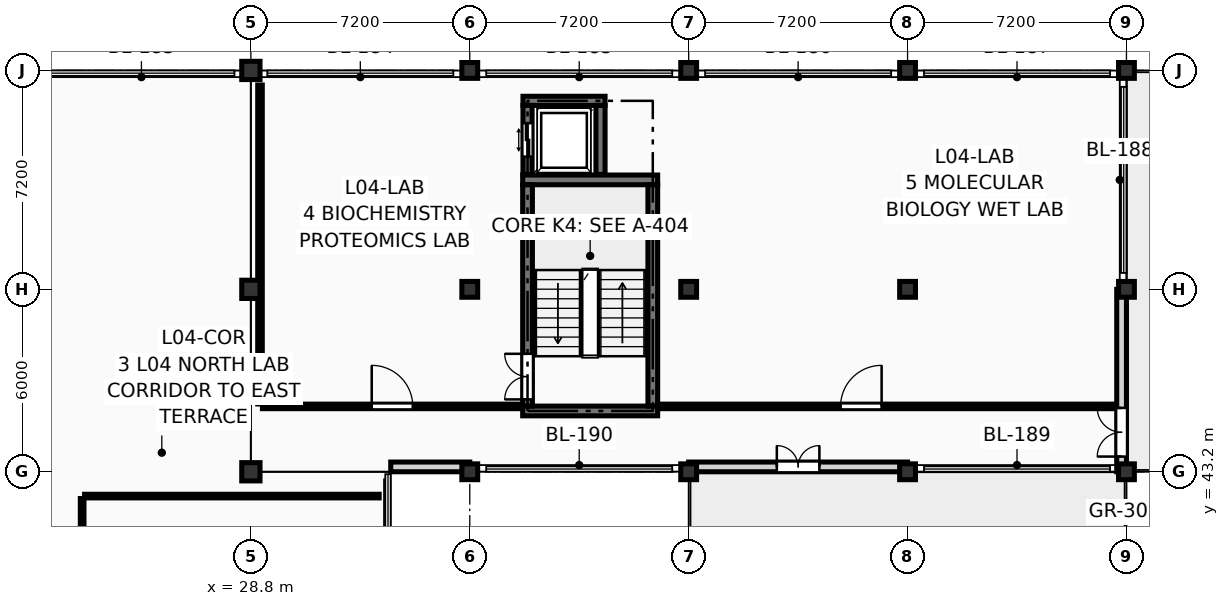
"""IFC4 building model, lengths in metres.
Left out: names, types, materials, properties, quantities, classifications, styles, units other than length and angle.
Written with IfcOpenShell. Run it as: python <this file> out.ifc"""

import sys

from ifc_helpers import new_model, si_unit, direction, frame, frame_2d, origin, origin_2d, place, context, subcontext, project, spatial, rectangle, extrude, element, fill, save


model = new_model("IFC4")
c1 = context("Model", 3, precision=1e-05, world=origin(), true_north=direction((0.0, 1.0)))
c2 = subcontext(c1, "Body", "Model", "MODEL_VIEW")
j1 = project(units=[si_unit("LENGTHUNIT", "METRE"), si_unit("PLANEANGLEUNIT", "RADIAN")], contexts=[c1])
p1 = place(None, origin())
s1 = spatial("IfcSite", under=j1, at=p1, CompositionType="ELEMENT")
p2 = place(p1, origin())
s2 = spatial("IfcBuilding", under=s1, at=p2, CompositionType="ELEMENT")
p3 = place(p2, frame((0.0, 0.0, 15.75)))
s3 = spatial("IfcBuildingStorey", under=s2, at=p3, CompositionType="ELEMENT", Elevation=15.75)
for number, where, z_axis, x_axis in (
    (1, (28.8, 43.2, 0.0), (0.0, 0.0, 1.0), (1.0, 0.0, 0.0)),
    (2, (28.8, 49.2, 0.0), (0.0, 0.0, 1.0), (1.0, 0.0, 0.0)),
    (3, (28.8, 56.4, 0.0), (0.0, 0.0, 1.0), (1.0, 0.0, 0.0)),
):
    element("IfcColumn", number, at=place(p3, frame(where, z_axis=z_axis, x_axis=x_axis)), inside=s3, PredefinedType="COLUMN", context=c2, shape_type="SweptSolid", body=[
        extrude(rectangle(XDim=0.6, YDim=0.6, at=origin_2d()), origin(), (0.0, 0.0, 1.0), 3.6),
    ])
for number, where, z_axis, x_axis in (
    (4, (36.0, 43.2, 0.0), (0.0, 0.0, 1.0), (1.0, 0.0, 0.0)),
    (5, (36.0, 49.2, 0.0), (0.0, 0.0, 1.0), (1.0, 0.0, 0.0)),
    (6, (36.0, 56.4, 0.0), (0.0, 0.0, 1.0), (1.0, 0.0, 0.0)),
    (7, (43.2, 43.2, 0.0), (0.0, 0.0, 1.0), (1.0, 0.0, 0.0)),
    (8, (43.2, 49.2, 0.0), (0.0, 0.0, 1.0), (1.0, 0.0, 0.0)),
    (9, (43.2, 56.4, 0.0), (0.0, 0.0, 1.0), (1.0, 0.0, 0.0)),
    (10, (50.4, 43.2, 0.0), (0.0, 0.0, 1.0), (1.0, 0.0, 0.0)),
    (11, (50.4, 49.2, 0.0), (0.0, 0.0, 1.0), (1.0, 0.0, 0.0)),
    (12, (50.4, 56.4, 0.0), (0.0, 0.0, 1.0), (1.0, 0.0, 0.0)),
    (13, (57.6, 43.2, 0.0), (0.0, 0.0, 1.0), (1.0, 0.0, 0.0)),
    (14, (57.6, 49.2, 0.0), (0.0, 0.0, 1.0), (1.0, 0.0, 0.0)),
    (15, (57.6, 56.4, 0.0), (0.0, 0.0, 1.0), (1.0, 0.0, 0.0)),
):
    element("IfcColumn", number, at=place(p3, frame(where, z_axis=z_axis, x_axis=x_axis)), inside=s3, PredefinedType="COLUMN", context=c2, shape_type="SweptSolid", body=[
        extrude(rectangle(XDim=0.52, YDim=0.52, at=origin_2d()), origin(), (0.0, 0.0, 1.0), 3.6),
    ])
p4 = place(p3, frame((57.44, 43.2, 0.0), z_axis=(0.0, 0.0, 1.0), x_axis=(0.0, 1.0, 0.0)))
e16 = element("IfcWall", 16, at=p4, inside=s3, PredefinedType="SOLIDWALL", context=c2, shape_type="SweptSolid", body=[
    extrude(rectangle(XDim=6.0, YDim=0.32, at=frame_2d((3.0, 0.0))), origin(), (0.0, 0.0, 1.0), 2.84),
])
p5 = place(p4, frame((0.5, 0.0, 0.0)))
e17 = element("IfcOpeningElement", 17, at=p5, cuts=e16, PredefinedType="OPENING", context=c2, shape_type="SweptSolid", body=[
    extrude(rectangle(XDim=1.6, YDim=2.25, at=frame_2d((0.8, 1.125))), frame((0.0, 0.172, 0.0), z_axis=(0.0, -1.0, 0.0), x_axis=(1.0, 0.0, 0.0)), (0.0, 0.0, 1.0), 0.344),
])
p6 = place(p3, frame((43.2, 43.36, 0.0), z_axis=(0.0, 0.0, 1.0), x_axis=(1.0, 0.0, 0.0)))
e18 = element("IfcWall", 18, at=p6, inside=s3, PredefinedType="SOLIDWALL", context=c2, shape_type="SweptSolid", body=[
    extrude(rectangle(XDim=7.2, YDim=0.32, at=frame_2d((3.6, 0.0))), origin(), (0.0, 0.0, 1.0), 2.84),
])
p7 = place(p6, frame((2.9, 0.0, 0.0)))
e19 = element("IfcOpeningElement", 19, at=p7, cuts=e18, PredefinedType="OPENING", context=c2, shape_type="SweptSolid", body=[
    extrude(rectangle(XDim=1.4, YDim=2.2, at=frame_2d((0.7, 1.1))), frame((0.0, 0.172, 0.0), z_axis=(0.0, -1.0, 0.0), x_axis=(1.0, 0.0, 0.0)), (0.0, 0.0, 1.0), 0.344),
])
p8 = place(p3, frame((33.4, 43.36, 0.0), z_axis=(0.0, 0.0, 1.0), x_axis=(1.0, 0.0, 0.0)))
e20 = element("IfcWall", 20, at=p8, inside=s3, PredefinedType="SOLIDWALL", context=c2, shape_type="SweptSolid", body=[
    extrude(rectangle(XDim=2.6, YDim=0.32, at=frame_2d((1.3, 0.0))), origin(), (0.0, 0.0, 1.0), 3.38),
])
for number, where, z_axis, x_axis in (
    (21, (37.74, 45.2, 0.0), (0.0, 0.0, 1.0), (1.0, 0.0, 0.0)),
    (22, (37.74, 52.8, 0.0), (0.0, 0.0, 1.0), (1.0, 0.0, 0.0)),
):
    element("IfcWall", number, at=place(p3, frame(where, z_axis=z_axis, x_axis=x_axis)), inside=s3, PredefinedType="SHEAR", context=c2, shape_type="SweptSolid", body=[
        extrude(rectangle(XDim=4.44, YDim=0.32, at=frame_2d((2.22, 0.0))), origin(), (0.0, 0.0, 1.0), 3.39),
    ])
p9 = place(p3, frame((37.9, 45.36, 0.0), z_axis=(0.0, 0.0, 1.0), x_axis=(0.0, 1.0, 0.0)))
e23 = element("IfcWall", 23, at=p9, inside=s3, PredefinedType="SHEAR", context=c2, shape_type="SweptSolid", body=[
    extrude(rectangle(XDim=7.28, YDim=0.32, at=frame_2d((3.64, 0.0))), origin(), (0.0, 0.0, 1.0), 3.39),
])
p10 = place(p9, frame((0.22, 0.0, 0.0)))
e24 = element("IfcOpeningElement", 24, at=p10, cuts=e23, PredefinedType="OPENING", context=c2, shape_type="SweptSolid", body=[
    extrude(rectangle(XDim=1.5, YDim=2.2, at=frame_2d((0.75, 1.1))), frame((0.0, 0.172, 0.0), z_axis=(0.0, -1.0, 0.0), x_axis=(1.0, 0.0, 0.0)), (0.0, 0.0, 1.0), 0.344),
])
p11 = place(p3, frame((42.02, 45.36, 0.0), z_axis=(0.0, 0.0, 1.0), x_axis=(0.0, 1.0, 0.0)))
e25 = element("IfcWall", 25, at=p11, inside=s3, PredefinedType="SHEAR", context=c2, shape_type="SweptSolid", body=[
    extrude(rectangle(XDim=7.28, YDim=0.32, at=frame_2d((3.64, 0.0))), origin(), (0.0, 0.0, 1.0), 3.39),
])
p12 = place(p3, frame((37.75, 55.4, 0.0), z_axis=(0.0, 0.0, 1.0), x_axis=(1.0, 0.0, 0.0)))
e26 = element("IfcWall", 26, at=p12, inside=s3, PredefinedType="SHEAR", context=c2, shape_type="SweptSolid", body=[
    extrude(rectangle(XDim=2.7, YDim=0.3, at=frame_2d((1.35, 0.0))), origin(), (0.0, 0.0, 1.0), 3.39),
])
p13 = place(p3, frame((37.9, 52.98, 0.0), z_axis=(0.0, 0.0, 1.0), x_axis=(0.0, 1.0, 0.0)))
e27 = element("IfcWall", 27, at=p13, inside=s3, PredefinedType="SHEAR", context=c2, shape_type="SweptSolid", body=[
    extrude(rectangle(XDim=2.27, YDim=0.3, at=frame_2d((1.135, 0.0))), origin(), (0.0, 0.0, 1.0), 3.39),
])
p14 = place(p13, frame((0.585, 0.0, 0.0)))
e28 = element("IfcOpeningElement", 28, at=p14, cuts=e27, PredefinedType="OPENING", context=c2, shape_type="SweptSolid", body=[
    extrude(rectangle(XDim=1.1, YDim=2.2, at=frame_2d((0.55, 1.1))), frame((0.0, 0.162, 0.0), z_axis=(0.0, -1.0, 0.0), x_axis=(1.0, 0.0, 0.0)), (0.0, 0.0, 1.0), 0.324),
])
p15 = place(p3, frame((40.3, 52.98, 0.0), z_axis=(0.0, 0.0, 1.0), x_axis=(0.0, 1.0, 0.0)))
e29 = element("IfcWall", 29, at=p15, inside=s3, PredefinedType="SHEAR", context=c2, shape_type="SweptSolid", body=[
    extrude(rectangle(XDim=2.27, YDim=0.3, at=frame_2d((1.135, 0.0))), origin(), (0.0, 0.0, 1.0), 3.39),
])
p16 = place(p3, frame((23.25, 31.68, 0.0), z_axis=(0.0, 0.0, 1.0), x_axis=(0.0, 1.0, 0.0)))
e30 = element("IfcWall", 30, at=p16, inside=s3, PredefinedType="PARTITIONING", context=c2, shape_type="SweptSolid", body=[
    extrude(rectangle(XDim=10.64, YDim=0.12, at=frame_2d((5.32, 0.0))), origin(), (0.0, 0.0, 1.0), 3.375),
])
p17 = place(p16, frame((5.77, 0.0, 0.0)))
e31 = element("IfcOpeningElement", 31, at=p17, cuts=e30, PredefinedType="OPENING", context=c2, shape_type="SweptSolid", body=[
    extrude(rectangle(XDim=1.32, YDim=2.2, at=frame_2d((0.66, 1.1))), frame((0.0, 0.072, 0.0), z_axis=(0.0, -1.0, 0.0), x_axis=(1.0, 0.0, 0.0)), (0.0, 0.0, 1.0), 0.144),
])
p18 = place(p3, frame((23.33, 42.4, 0.0), z_axis=(0.0, 0.0, 1.0), x_axis=(1.0, 0.0, 0.0)))
e32 = element("IfcWall", 32, at=p18, inside=s3, PredefinedType="PARTITIONING", context=c2, shape_type="SweptSolid", body=[
    extrude(rectangle(XDim=9.69, YDim=0.12, at=frame_2d((4.845, 0.0))), origin(), (0.0, 0.0, 1.0), 3.375),
])
p19 = place(p3, frame((29.1, 45.43, 0.0), z_axis=(0.0, 0.0, 1.0), x_axis=(0.0, 1.0, 0.0)))
e33 = element("IfcWall", 33, at=p19, inside=s3, PredefinedType="PARTITIONING", context=c2, shape_type="SweptSolid", body=[
    extrude(rectangle(XDim=10.49, YDim=0.15, at=frame_2d((5.245, 0.0))), origin(), (0.0, 0.0, 1.0), 2.655),
])
p20 = place(p3, frame((29.18, 45.35, 0.0), z_axis=(0.0, 0.0, 1.0), x_axis=(1.0, 0.0, 0.0)))
e34 = element("IfcWall", 34, at=p20, inside=s3, PredefinedType="PARTITIONING", context=c2, shape_type="SweptSolid", body=[
    extrude(rectangle(XDim=8.54, YDim=0.15, at=frame_2d((4.27, 0.0))), origin(), (0.0, 0.0, 1.0), 3.375),
])
p21 = place(p20, frame((3.595, 0.0, 0.0)))
e35 = element("IfcOpeningElement", 35, at=p21, cuts=e34, PredefinedType="OPENING", context=c2, shape_type="SweptSolid", body=[
    extrude(rectangle(XDim=1.35, YDim=2.2, at=frame_2d((0.675, 1.1))), frame((0.0, 0.087, 0.0), z_axis=(0.0, -1.0, 0.0), x_axis=(1.0, 0.0, 0.0)), (0.0, 0.0, 1.0), 0.174),
])
p22 = place(p3, frame((42.18, 45.35, 0.0), z_axis=(0.0, 0.0, 1.0), x_axis=(1.0, 0.0, 0.0)))
e36 = element("IfcWall", 36, at=p22, inside=s3, PredefinedType="PARTITIONING", context=c2, shape_type="SweptSolid", body=[
    extrude(rectangle(XDim=15.04, YDim=0.15, at=frame_2d((7.52, 0.0))), origin(), (0.0, 0.0, 1.0), 3.375),
])
p23 = place(p22, frame((6.017, 0.0, 0.0)))
e37 = element("IfcOpeningElement", 37, at=p23, cuts=e36, PredefinedType="OPENING", context=c2, shape_type="SweptSolid", body=[
    extrude(rectangle(XDim=1.35, YDim=2.2, at=frame_2d((0.675, 1.1))), frame((0.0, 0.087, 0.0), z_axis=(0.0, -1.0, 0.0), x_axis=(1.0, 0.0, 0.0)), (0.0, 0.0, 1.0), 0.174),
])
p24 = place(p5, origin())
e38 = element("IfcDoor", 38, at=p24, inside=s3, OperationType="DOUBLE_DOOR_SINGLE_SWING", PredefinedType="DOOR", context=c2, shape_type="SweptSolid", body=[
    extrude(rectangle(XDim=1.6, YDim=2.25, at=frame_2d((0.8, 1.125))), frame((0.0, 0.025, 0.0), z_axis=(0.0, -1.0, 0.0), x_axis=(1.0, 0.0, 0.0)), (0.0, 0.0, 1.0), 0.05),
])
fill(e17, e38)
p25 = place(p7, origin())
e39 = element("IfcDoor", 39, at=p25, inside=s3, OperationType="DOUBLE_DOOR_SINGLE_SWING", PredefinedType="DOOR", context=c2, shape_type="SweptSolid", body=[
    extrude(rectangle(XDim=1.4, YDim=2.2, at=frame_2d((0.7, 1.1))), frame((0.0, 0.025, 0.0), z_axis=(0.0, -1.0, 0.0), x_axis=(1.0, 0.0, 0.0)), (0.0, 0.0, 1.0), 0.05),
])
fill(e19, e39)
p26 = place(p10, origin())
e40 = element("IfcDoor", 40, at=p26, inside=s3, OperationType="DOUBLE_DOOR_SINGLE_SWING", PredefinedType="DOOR", context=c2, shape_type="SweptSolid", body=[
    extrude(rectangle(XDim=1.5, YDim=2.2, at=frame_2d((0.75, 1.1))), frame((0.0, 0.025, 0.0), z_axis=(0.0, -1.0, 0.0), x_axis=(1.0, 0.0, 0.0)), (0.0, 0.0, 1.0), 0.05),
])
fill(e24, e40)
p27 = place(p14, origin())
e41 = element("IfcDoor", 41, at=p27, inside=s3, OperationType="DOUBLE_DOOR_SLIDING", PredefinedType="DOOR", context=c2, shape_type="SweptSolid", body=[
    extrude(rectangle(XDim=1.1, YDim=2.2, at=frame_2d((0.55, 1.1))), frame((0.0, 0.025, 0.0), z_axis=(0.0, -1.0, 0.0), x_axis=(1.0, 0.0, 0.0)), (0.0, 0.0, 1.0), 0.05),
])
fill(e28, e41)
p28 = place(p21, origin())
e42 = element("IfcDoor", 42, at=p28, inside=s3, OperationType="SINGLE_SWING_LEFT", PredefinedType="DOOR", context=c2, shape_type="SweptSolid", body=[
    extrude(rectangle(XDim=1.35, YDim=2.2, at=frame_2d((0.675, 1.1))), frame((0.0, 0.025, 0.0), z_axis=(0.0, -1.0, 0.0), x_axis=(1.0, 0.0, 0.0)), (0.0, 0.0, 1.0), 0.05),
])
fill(e35, e42)
p29 = place(p23, origin())
e43 = element("IfcDoor", 43, at=p29, inside=s3, OperationType="SINGLE_SWING_RIGHT", PredefinedType="DOOR", context=c2, shape_type="SweptSolid", body=[
    extrude(rectangle(XDim=1.35, YDim=2.2, at=frame_2d((0.675, 1.1))), frame((0.0, 0.025, 0.0), z_axis=(0.0, -1.0, 0.0), x_axis=(1.0, 0.0, 0.0)), (0.0, 0.0, 1.0), 0.05),
])
fill(e37, e43)
save(model, sys.argv[1])
